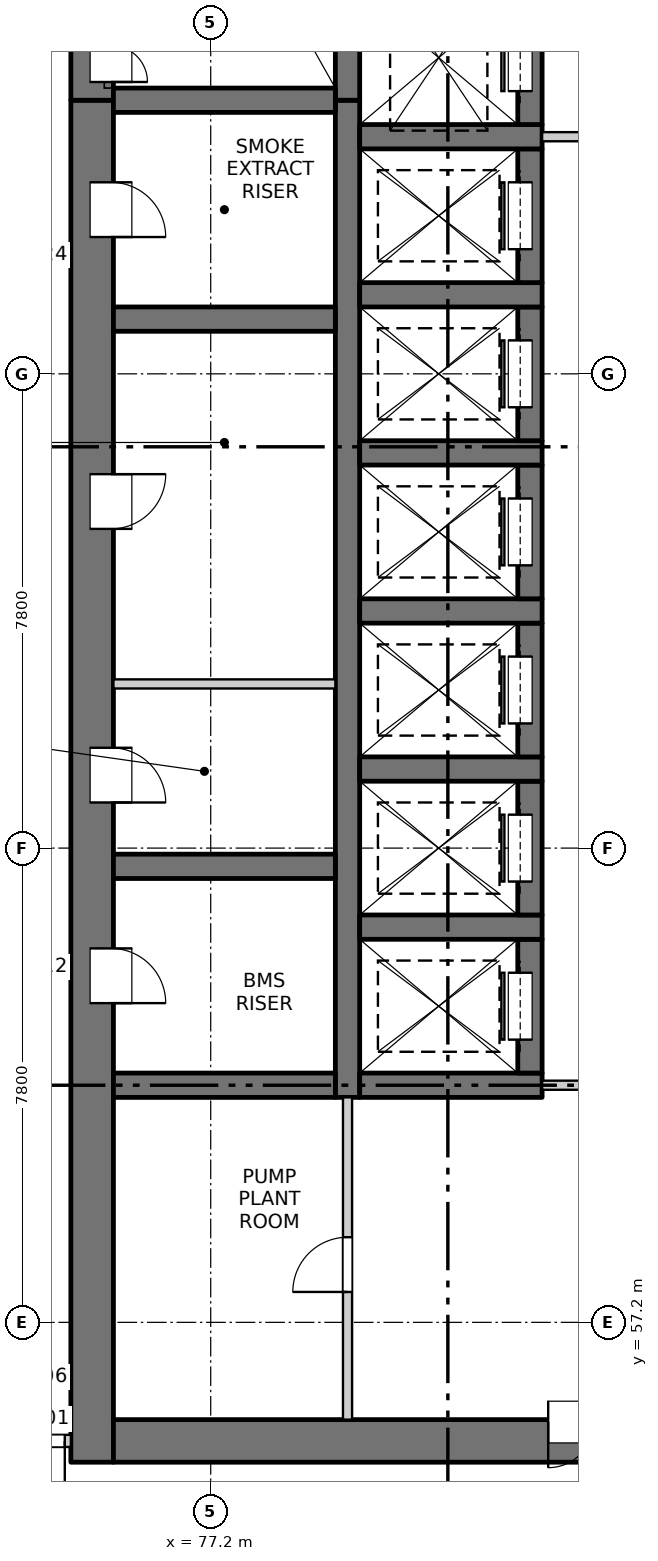
"""IFC4 building model, lengths in metres.
Left out: names, types, materials, properties, quantities, classifications, styles, units other than length and angle.
Written with IfcOpenShell. Run it as: python <this file> out.ifc"""

import sys

from ifc_helpers import new_model, si_unit, direction, frame, frame_2d, origin, place, context, subcontext, project, spatial, rectangle, extrude, element, fill, save


model = new_model("IFC4")
c1 = context("Model", 3, precision=1e-05, world=origin(), true_north=direction((0.0, 1.0)))
c2 = subcontext(c1, "Body", "Model", "MODEL_VIEW")
j1 = project(units=[si_unit("LENGTHUNIT", "METRE"), si_unit("PLANEANGLEUNIT", "RADIAN")], contexts=[c1])
p1 = place(None, origin())
s1 = spatial("IfcSite", under=j1, at=p1, CompositionType="ELEMENT")
p2 = place(p1, origin())
s2 = spatial("IfcBuilding", under=s1, at=p2, CompositionType="ELEMENT")
p3 = place(p2, frame((0.0, 0.0, 46.7)))
s3 = spatial("IfcBuildingStorey", under=s2, at=p3, CompositionType="ELEMENT", Elevation=46.7)
p4 = place(p3, frame((75.25, 54.9, -0.3), z_axis=(0.0, 0.0, 1.0), x_axis=(0.0, 1.0, 0.0)))
e1 = element("IfcWall", 1, at=p4, inside=s3, PredefinedType="SOLIDWALL", context=c2, shape_type="SweptSolid", body=[
    extrude(rectangle(XDim=22.4, YDim=0.7, at=frame_2d((11.2, 0.0))), origin(), (0.0, 0.0, 1.0), 4.5),
])
p5 = place(p4, frame((7.55, 0.0, 0.3)))
e2 = element("IfcOpeningElement", 2, at=p5, cuts=e1, PredefinedType="OPENING", context=c2, shape_type="SweptSolid", body=[
    extrude(rectangle(XDim=0.9, YDim=2.1, at=frame_2d((0.45, 1.05))), frame((0.0, 0.36, 0.0), z_axis=(0.0, -1.0, 0.0), x_axis=(1.0, 0.0, 0.0)), (0.0, 0.0, 1.0), 0.72),
])
p6 = place(p4, frame((10.85, 0.0, 0.3)))
e3 = element("IfcOpeningElement", 3, at=p6, cuts=e1, PredefinedType="OPENING", context=c2, shape_type="SweptSolid", body=[
    extrude(rectangle(XDim=0.9, YDim=2.1, at=frame_2d((0.45, 1.05))), frame((0.0, 0.36, 0.0), z_axis=(0.0, -1.0, 0.0), x_axis=(1.0, 0.0, 0.0)), (0.0, 0.0, 1.0), 0.72),
])
p7 = place(p4, frame((15.35, 0.0, 0.3)))
e4 = element("IfcOpeningElement", 4, at=p7, cuts=e1, PredefinedType="OPENING", context=c2, shape_type="SweptSolid", body=[
    extrude(rectangle(XDim=0.9, YDim=2.1, at=frame_2d((0.45, 1.05))), frame((0.0, 0.36, 0.0), z_axis=(0.0, -1.0, 0.0), x_axis=(1.0, 0.0, 0.0)), (0.0, 0.0, 1.0), 0.72),
])
p8 = place(p4, frame((20.15, 0.0, 0.3)))
e5 = element("IfcOpeningElement", 5, at=p8, cuts=e1, PredefinedType="OPENING", context=c2, shape_type="SweptSolid", body=[
    extrude(rectangle(XDim=0.9, YDim=2.1, at=frame_2d((0.45, 1.05))), frame((0.0, 0.36, 0.0), z_axis=(0.0, -1.0, 0.0), x_axis=(1.0, 0.0, 0.0)), (0.0, 0.0, 1.0), 0.72),
])
p9 = place(p3, frame((75.25, 77.3, -0.3), z_axis=(0.0, 0.0, 1.0), x_axis=(0.0, 1.0, 0.0)))
e6 = element("IfcWall", 6, at=p9, inside=s3, PredefinedType="SOLIDWALL", context=c2, shape_type="SweptSolid", body=[
    extrude(rectangle(XDim=7.55, YDim=0.7, at=frame_2d((3.775, 0.0))), origin(), (0.0, 0.0, 1.0), 4.5),
])
p10 = place(p9, frame((0.3, 0.0, 0.3)))
e7 = element("IfcOpeningElement", 7, at=p10, cuts=e6, PredefinedType="OPENING", context=c2, shape_type="SweptSolid", body=[
    extrude(rectangle(XDim=1.2, YDim=2.1, at=frame_2d((0.6, 1.05))), frame((0.0, 0.36, 0.0), z_axis=(0.0, -1.0, 0.0), x_axis=(1.0, 0.0, 0.0)), (0.0, 0.0, 1.0), 0.72),
])
p11 = place(p3, frame((75.6, 55.25, -0.3), z_axis=(0.0, 0.0, 1.0), x_axis=(1.0, 0.0, 0.0)))
e8 = element("IfcWall", 8, at=p11, inside=s3, PredefinedType="SOLIDWALL", context=c2, shape_type="SweptSolid", body=[
    extrude(rectangle(XDim=18.8, YDim=0.7, at=frame_2d((9.4, 0.0))), origin(), (0.0, 0.0, 1.0), 4.5),
])
p12 = place(p11, frame((7.15, 0.0, 0.3)))
e9 = element("IfcOpeningElement", 9, at=p12, cuts=e8, PredefinedType="OPENING", context=c2, shape_type="SweptSolid", body=[
    extrude(rectangle(XDim=1.5, YDim=2.1, at=frame_2d((0.75, 1.05))), frame((0.0, 0.36, 0.0), z_axis=(0.0, -1.0, 0.0), x_axis=(1.0, 0.0, 0.0)), (0.0, 0.0, 1.0), 0.72),
])
p13 = place(p3, frame((79.45, 60.9, -0.3), z_axis=(0.0, 0.0, 1.0), x_axis=(0.0, 1.0, 0.0)))
e10 = element("IfcWall", 10, at=p13, inside=s3, PredefinedType="SOLIDWALL", context=c2, shape_type="SweptSolid", body=[
    extrude(rectangle(XDim=16.4, YDim=0.4, at=frame_2d((8.2, 0.0))), origin(), (0.0, 0.0, 1.0), 4.5),
])
p14 = place(p3, frame((79.45, 77.3, -0.3), z_axis=(0.0, 0.0, 1.0), x_axis=(0.0, 1.0, 0.0)))
e11 = element("IfcWall", 11, at=p14, inside=s3, PredefinedType="SOLIDWALL", context=c2, shape_type="SweptSolid", body=[
    extrude(rectangle(XDim=6.85, YDim=0.4, at=frame_2d((3.425, 0.0))), origin(), (0.0, 0.0, 1.0), 4.5),
])
p15 = place(p3, frame((79.65, 61.1, -0.3), z_axis=(0.0, 0.0, 1.0), x_axis=(1.0, 0.0, 0.0)))
e12 = element("IfcWall", 12, at=p15, inside=s3, PredefinedType="SOLIDWALL", context=c2, shape_type="SweptSolid", body=[
    extrude(rectangle(XDim=3.0, YDim=0.4, at=frame_2d((1.5, 0.0))), origin(), (0.0, 0.0, 1.0), 4.5),
])
p16 = place(p3, frame((82.45, 61.3, -0.3), z_axis=(0.0, 0.0, 1.0), x_axis=(0.0, 1.0, 0.0)))
e13 = element("IfcWall", 13, at=p16, inside=s3, PredefinedType="SOLIDWALL", context=c2, shape_type="SweptSolid", body=[
    extrude(rectangle(XDim=2.2, YDim=0.4, at=frame_2d((1.1, 0.0))), origin(), (0.0, 0.0, 1.0), 4.5),
])
p17 = place(p16, frame((0.55, 0.0, 0.3)))
e14 = element("IfcOpeningElement", 14, at=p17, cuts=e13, PredefinedType="OPENING", context=c2, shape_type="SweptSolid", body=[
    extrude(rectangle(XDim=1.1, YDim=2.1, at=frame_2d((0.55, 1.05))), frame((0.0, 0.21, 0.0), z_axis=(0.0, -1.0, 0.0), x_axis=(1.0, 0.0, 0.0)), (0.0, 0.0, 1.0), 0.42),
])
p18 = place(p3, frame((79.65, 63.7, -0.3), z_axis=(0.0, 0.0, 1.0), x_axis=(1.0, 0.0, 0.0)))
e15 = element("IfcWall", 15, at=p18, inside=s3, PredefinedType="SOLIDWALL", context=c2, shape_type="SweptSolid", body=[
    extrude(rectangle(XDim=3.0, YDim=0.4, at=frame_2d((1.5, 0.0))), origin(), (0.0, 0.0, 1.0), 4.5),
])
p19 = place(p3, frame((82.45, 63.9, -0.3), z_axis=(0.0, 0.0, 1.0), x_axis=(0.0, 1.0, 0.0)))
e16 = element("IfcWall", 16, at=p19, inside=s3, PredefinedType="SOLIDWALL", context=c2, shape_type="SweptSolid", body=[
    extrude(rectangle(XDim=2.2, YDim=0.4, at=frame_2d((1.1, 0.0))), origin(), (0.0, 0.0, 1.0), 4.5),
])
p20 = place(p19, frame((0.55, 0.0, 0.3)))
e17 = element("IfcOpeningElement", 17, at=p20, cuts=e16, PredefinedType="OPENING", context=c2, shape_type="SweptSolid", body=[
    extrude(rectangle(XDim=1.1, YDim=2.1, at=frame_2d((0.55, 1.05))), frame((0.0, 0.21, 0.0), z_axis=(0.0, -1.0, 0.0), x_axis=(1.0, 0.0, 0.0)), (0.0, 0.0, 1.0), 0.42),
])
p21 = place(p3, frame((79.65, 66.3, -0.3), z_axis=(0.0, 0.0, 1.0), x_axis=(1.0, 0.0, 0.0)))
e18 = element("IfcWall", 18, at=p21, inside=s3, PredefinedType="SOLIDWALL", context=c2, shape_type="SweptSolid", body=[
    extrude(rectangle(XDim=3.0, YDim=0.4, at=frame_2d((1.5, 0.0))), origin(), (0.0, 0.0, 1.0), 4.5),
])
p22 = place(p3, frame((82.45, 66.5, -0.3), z_axis=(0.0, 0.0, 1.0), x_axis=(0.0, 1.0, 0.0)))
e19 = element("IfcWall", 19, at=p22, inside=s3, PredefinedType="SOLIDWALL", context=c2, shape_type="SweptSolid", body=[
    extrude(rectangle(XDim=2.2, YDim=0.4, at=frame_2d((1.1, 0.0))), origin(), (0.0, 0.0, 1.0), 4.5),
])
p23 = place(p22, frame((0.55, 0.0, 0.3)))
e20 = element("IfcOpeningElement", 20, at=p23, cuts=e19, PredefinedType="OPENING", context=c2, shape_type="SweptSolid", body=[
    extrude(rectangle(XDim=1.1, YDim=2.1, at=frame_2d((0.55, 1.05))), frame((0.0, 0.21, 0.0), z_axis=(0.0, -1.0, 0.0), x_axis=(1.0, 0.0, 0.0)), (0.0, 0.0, 1.0), 0.42),
])
p24 = place(p3, frame((79.65, 68.9, -0.3), z_axis=(0.0, 0.0, 1.0), x_axis=(1.0, 0.0, 0.0)))
e21 = element("IfcWall", 21, at=p24, inside=s3, PredefinedType="SOLIDWALL", context=c2, shape_type="SweptSolid", body=[
    extrude(rectangle(XDim=3.0, YDim=0.4, at=frame_2d((1.5, 0.0))), origin(), (0.0, 0.0, 1.0), 4.5),
])
p25 = place(p3, frame((82.45, 69.1, -0.3), z_axis=(0.0, 0.0, 1.0), x_axis=(0.0, 1.0, 0.0)))
e22 = element("IfcWall", 22, at=p25, inside=s3, PredefinedType="SOLIDWALL", context=c2, shape_type="SweptSolid", body=[
    extrude(rectangle(XDim=2.2, YDim=0.4, at=frame_2d((1.1, 0.0))), origin(), (0.0, 0.0, 1.0), 4.5),
])
p26 = place(p25, frame((0.55, 0.0, 0.3)))
e23 = element("IfcOpeningElement", 23, at=p26, cuts=e22, PredefinedType="OPENING", context=c2, shape_type="SweptSolid", body=[
    extrude(rectangle(XDim=1.1, YDim=2.1, at=frame_2d((0.55, 1.05))), frame((0.0, 0.21, 0.0), z_axis=(0.0, -1.0, 0.0), x_axis=(1.0, 0.0, 0.0)), (0.0, 0.0, 1.0), 0.42),
])
p27 = place(p3, frame((79.65, 71.5, -0.3), z_axis=(0.0, 0.0, 1.0), x_axis=(1.0, 0.0, 0.0)))
e24 = element("IfcWall", 24, at=p27, inside=s3, PredefinedType="SOLIDWALL", context=c2, shape_type="SweptSolid", body=[
    extrude(rectangle(XDim=3.0, YDim=0.4, at=frame_2d((1.5, 0.0))), origin(), (0.0, 0.0, 1.0), 4.5),
])
p28 = place(p3, frame((82.45, 71.7, -0.3), z_axis=(0.0, 0.0, 1.0), x_axis=(0.0, 1.0, 0.0)))
e25 = element("IfcWall", 25, at=p28, inside=s3, PredefinedType="SOLIDWALL", context=c2, shape_type="SweptSolid", body=[
    extrude(rectangle(XDim=2.2, YDim=0.4, at=frame_2d((1.1, 0.0))), origin(), (0.0, 0.0, 1.0), 4.5),
])
p29 = place(p28, frame((0.55, 0.0, 0.3)))
e26 = element("IfcOpeningElement", 26, at=p29, cuts=e25, PredefinedType="OPENING", context=c2, shape_type="SweptSolid", body=[
    extrude(rectangle(XDim=1.1, YDim=2.1, at=frame_2d((0.55, 1.05))), frame((0.0, 0.21, 0.0), z_axis=(0.0, -1.0, 0.0), x_axis=(1.0, 0.0, 0.0)), (0.0, 0.0, 1.0), 0.42),
])
p30 = place(p3, frame((79.65, 74.1, -0.3), z_axis=(0.0, 0.0, 1.0), x_axis=(1.0, 0.0, 0.0)))
e27 = element("IfcWall", 27, at=p30, inside=s3, PredefinedType="SOLIDWALL", context=c2, shape_type="SweptSolid", body=[
    extrude(rectangle(XDim=3.0, YDim=0.4, at=frame_2d((1.5, 0.0))), origin(), (0.0, 0.0, 1.0), 4.5),
])
p31 = place(p3, frame((82.45, 74.3, -0.3), z_axis=(0.0, 0.0, 1.0), x_axis=(0.0, 1.0, 0.0)))
e28 = element("IfcWall", 28, at=p31, inside=s3, PredefinedType="SOLIDWALL", context=c2, shape_type="SweptSolid", body=[
    extrude(rectangle(XDim=2.2, YDim=0.4, at=frame_2d((1.1, 0.0))), origin(), (0.0, 0.0, 1.0), 4.5),
])
p32 = place(p31, frame((0.55, 0.0, 0.3)))
e29 = element("IfcOpeningElement", 29, at=p32, cuts=e28, PredefinedType="OPENING", context=c2, shape_type="SweptSolid", body=[
    extrude(rectangle(XDim=1.1, YDim=2.1, at=frame_2d((0.55, 1.05))), frame((0.0, 0.21, 0.0), z_axis=(0.0, -1.0, 0.0), x_axis=(1.0, 0.0, 0.0)), (0.0, 0.0, 1.0), 0.42),
])
p33 = place(p3, frame((79.65, 76.7, -0.3), z_axis=(0.0, 0.0, 1.0), x_axis=(1.0, 0.0, 0.0)))
e30 = element("IfcWall", 30, at=p33, inside=s3, PredefinedType="SOLIDWALL", context=c2, shape_type="SweptSolid", body=[
    extrude(rectangle(XDim=3.0, YDim=0.4, at=frame_2d((1.5, 0.0))), origin(), (0.0, 0.0, 1.0), 4.5),
])
p34 = place(p3, frame((82.45, 76.9, -0.3), z_axis=(0.0, 0.0, 1.0), x_axis=(0.0, 1.0, 0.0)))
e31 = element("IfcWall", 31, at=p34, inside=s3, PredefinedType="SOLIDWALL", context=c2, shape_type="SweptSolid", body=[
    extrude(rectangle(XDim=2.2, YDim=0.4, at=frame_2d((1.1, 0.0))), origin(), (0.0, 0.0, 1.0), 4.5),
])
p35 = place(p34, frame((0.55, 0.0, 0.3)))
e32 = element("IfcOpeningElement", 32, at=p35, cuts=e31, PredefinedType="OPENING", context=c2, shape_type="SweptSolid", body=[
    extrude(rectangle(XDim=1.1, YDim=2.1, at=frame_2d((0.55, 1.05))), frame((0.0, 0.21, 0.0), z_axis=(0.0, -1.0, 0.0), x_axis=(1.0, 0.0, 0.0)), (0.0, 0.0, 1.0), 0.42),
])
for number, where, z_axis, x_axis in (
    (33, (75.6, 61.1, -0.3), (0.0, 0.0, 1.0), (1.0, 0.0, 0.0)),
    (34, (75.6, 64.7, -0.3), (0.0, 0.0, 1.0), (1.0, 0.0, 0.0)),
    (35, (75.6, 73.7, -0.3), (0.0, 0.0, 1.0), (1.0, 0.0, 0.0)),
    (36, (75.6, 77.3, -0.3), (0.0, 0.0, 1.0), (1.0, 0.0, 0.0)),
):
    element("IfcWall", number, at=place(p3, frame(where, z_axis=z_axis, x_axis=x_axis)), inside=s3, PredefinedType="SOLIDWALL", context=c2, shape_type="SweptSolid", body=[
        extrude(rectangle(XDim=3.65, YDim=0.4, at=frame_2d((1.825, 0.0))), origin(), (0.0, 0.0, 1.0), 4.5),
    ])
p36 = place(p3, frame((73.2, 55.25, 0.0), z_axis=(0.0, 0.0, 1.0), x_axis=(1.0, 0.0, 0.0)))
e37 = element("IfcWall", 37, at=p36, inside=s3, PredefinedType="PARTITIONING", context=c2, shape_type="SweptSolid", body=[
    extrude(rectangle(XDim=1.7, YDim=0.2, at=frame_2d((0.85, 0.0))), origin(), (0.0, 0.0, 1.0), 4.2),
])
p37 = place(p36, frame((0.1, 0.0, 0.0)))
e38 = element("IfcOpeningElement", 38, at=p37, cuts=e37, PredefinedType="OPENING", context=c2, shape_type="SweptSolid", body=[
    extrude(rectangle(XDim=1.5, YDim=2.1, at=frame_2d((0.75, 1.05))), frame((0.0, 0.11, 0.0), z_axis=(0.0, -1.0, 0.0), x_axis=(1.0, 0.0, 0.0)), (0.0, 0.0, 1.0), 0.22),
])
p38 = place(p3, frame((82.65, 61.1, 0.0), z_axis=(0.0, 0.0, 1.0), x_axis=(1.0, 0.0, 0.0)))
e39 = element("IfcWall", 39, at=p38, inside=s3, PredefinedType="PARTITIONING", context=c2, shape_type="SweptSolid", body=[
    extrude(rectangle(XDim=4.7, YDim=0.15, at=frame_2d((2.35, 0.0))), origin(), (0.0, 0.0, 1.0), 4.2),
])
p39 = place(p38, frame((1.45, 0.0, 0.0)))
e40 = element("IfcOpeningElement", 40, at=p39, cuts=e39, PredefinedType="OPENING", context=c2, shape_type="SweptSolid", body=[
    extrude(rectangle(XDim=1.8, YDim=2.1, at=frame_2d((0.9, 1.05))), frame((0.0, 0.085, 0.0), z_axis=(0.0, -1.0, 0.0), x_axis=(1.0, 0.0, 0.0)), (0.0, 0.0, 1.0), 0.17),
])
p40 = place(p3, frame((75.6, 67.7, 0.0), z_axis=(0.0, 0.0, 1.0), x_axis=(1.0, 0.0, 0.0)))
e41 = element("IfcWall", 41, at=p40, inside=s3, PredefinedType="PARTITIONING", context=c2, shape_type="SweptSolid", body=[
    extrude(rectangle(XDim=3.65, YDim=0.15, at=frame_2d((1.825, 0.0))), origin(), (0.0, 0.0, 1.0), 4.2),
])
p41 = place(p3, frame((82.65, 76.7, 0.0), z_axis=(0.0, 0.0, 1.0), x_axis=(1.0, 0.0, 0.0)))
e42 = element("IfcWall", 42, at=p41, inside=s3, PredefinedType="PARTITIONING", context=c2, shape_type="SweptSolid", body=[
    extrude(rectangle(XDim=4.7, YDim=0.15, at=frame_2d((2.35, 0.0))), origin(), (0.0, 0.0, 1.0), 4.2),
])
p42 = place(p41, frame((1.45, 0.0, 0.0)))
e43 = element("IfcOpeningElement", 43, at=p42, cuts=e42, PredefinedType="OPENING", context=c2, shape_type="SweptSolid", body=[
    extrude(rectangle(XDim=1.8, YDim=2.1, at=frame_2d((0.9, 1.05))), frame((0.0, 0.085, 0.0), z_axis=(0.0, -1.0, 0.0), x_axis=(1.0, 0.0, 0.0)), (0.0, 0.0, 1.0), 0.17),
])
p43 = place(p3, frame((79.45, 55.6, 0.0), z_axis=(0.0, 0.0, 1.0), x_axis=(0.0, 1.0, 0.0)))
e44 = element("IfcWall", 44, at=p43, inside=s3, PredefinedType="PARTITIONING", context=c2, shape_type="SweptSolid", body=[
    extrude(rectangle(XDim=5.3, YDim=0.15, at=frame_2d((2.65, 0.0))), origin(), (0.0, 0.0, 1.0), 4.2),
])
p44 = place(p43, frame((2.1, 0.0, 0.0)))
e45 = element("IfcOpeningElement", 45, at=p44, cuts=e44, PredefinedType="OPENING", context=c2, shape_type="SweptSolid", body=[
    extrude(rectangle(XDim=0.9, YDim=2.1, at=frame_2d((0.45, 1.05))), frame((0.0, 0.085, 0.0), z_axis=(0.0, -1.0, 0.0), x_axis=(1.0, 0.0, 0.0)), (0.0, 0.0, 1.0), 0.17),
])
p45 = place(p37, origin())
e46 = element("IfcDoor", 46, at=p45, inside=s3, OperationType="DOUBLE_DOOR_SINGLE_SWING", PredefinedType="DOOR", context=c2, shape_type="SweptSolid", body=[
    extrude(rectangle(XDim=1.5, YDim=2.1, at=frame_2d((0.75, 1.05))), frame((0.0, 0.025, 0.0), z_axis=(0.0, -1.0, 0.0), x_axis=(1.0, 0.0, 0.0)), (0.0, 0.0, 1.0), 0.05),
])
fill(e38, e46)
p46 = place(p12, origin())
e47 = element("IfcDoor", 47, at=p46, inside=s3, OperationType="DOUBLE_DOOR_SINGLE_SWING", PredefinedType="DOOR", context=c2, shape_type="SweptSolid", body=[
    extrude(rectangle(XDim=1.5, YDim=2.1, at=frame_2d((0.75, 1.05))), frame((0.0, 0.335, 0.0), z_axis=(0.0, -1.0, 0.0), x_axis=(1.0, 0.0, 0.0)), (0.0, 0.0, 1.0), 0.05),
])
fill(e9, e47)
p47 = place(p44, origin())
e48 = element("IfcDoor", 48, at=p47, inside=s3, OperationType="SINGLE_SWING_LEFT", PredefinedType="DOOR", context=c2, shape_type="SweptSolid", body=[
    extrude(rectangle(XDim=0.9, YDim=2.1, at=frame_2d((0.45, 1.05))), frame((0.0, 0.025, 0.0), z_axis=(0.0, -1.0, 0.0), x_axis=(1.0, 0.0, 0.0)), (0.0, 0.0, 1.0), 0.05),
])
fill(e45, e48)
p48 = place(p17, origin())
e49 = element("IfcDoor", 49, at=p48, inside=s3, OperationType="SLIDING_TO_RIGHT", PredefinedType="DOOR", context=c2, shape_type="SweptSolid", body=[
    extrude(rectangle(XDim=1.1, YDim=2.1, at=frame_2d((0.55, 1.05))), frame((0.0, 0.185, 0.0), z_axis=(0.0, -1.0, 0.0), x_axis=(1.0, 0.0, 0.0)), (0.0, 0.0, 1.0), 0.05),
])
fill(e14, e49)
p49 = place(p5, origin())
e50 = element("IfcDoor", 50, at=p49, inside=s3, OperationType="SINGLE_SWING_RIGHT", PredefinedType="DOOR", context=c2, shape_type="SweptSolid", body=[
    extrude(rectangle(XDim=0.9, YDim=2.1, at=frame_2d((0.45, 1.05))), frame((0.0, -0.285, 0.0), z_axis=(0.0, -1.0, 0.0), x_axis=(1.0, 0.0, 0.0)), (0.0, 0.0, 1.0), 0.05),
])
fill(e2, e50)
p50 = place(p20, origin())
e51 = element("IfcDoor", 51, at=p50, inside=s3, OperationType="SLIDING_TO_RIGHT", PredefinedType="DOOR", context=c2, shape_type="SweptSolid", body=[
    extrude(rectangle(XDim=1.1, YDim=2.1, at=frame_2d((0.55, 1.05))), frame((0.0, 0.185, 0.0), z_axis=(0.0, -1.0, 0.0), x_axis=(1.0, 0.0, 0.0)), (0.0, 0.0, 1.0), 0.05),
])
fill(e17, e51)
p51 = place(p6, origin())
e52 = element("IfcDoor", 52, at=p51, inside=s3, OperationType="SINGLE_SWING_RIGHT", PredefinedType="DOOR", context=c2, shape_type="SweptSolid", body=[
    extrude(rectangle(XDim=0.9, YDim=2.1, at=frame_2d((0.45, 1.05))), frame((0.0, -0.285, 0.0), z_axis=(0.0, -1.0, 0.0), x_axis=(1.0, 0.0, 0.0)), (0.0, 0.0, 1.0), 0.05),
])
fill(e3, e52)
p52 = place(p23, origin())
e53 = element("IfcDoor", 53, at=p52, inside=s3, OperationType="SLIDING_TO_RIGHT", PredefinedType="DOOR", context=c2, shape_type="SweptSolid", body=[
    extrude(rectangle(XDim=1.1, YDim=2.1, at=frame_2d((0.55, 1.05))), frame((0.0, 0.185, 0.0), z_axis=(0.0, -1.0, 0.0), x_axis=(1.0, 0.0, 0.0)), (0.0, 0.0, 1.0), 0.05),
])
fill(e20, e53)
p53 = place(p26, origin())
e54 = element("IfcDoor", 54, at=p53, inside=s3, OperationType="SLIDING_TO_LEFT", PredefinedType="DOOR", context=c2, shape_type="SweptSolid", body=[
    extrude(rectangle(XDim=1.1, YDim=2.1, at=frame_2d((0.55, 1.05))), frame((0.0, 0.185, 0.0), z_axis=(0.0, -1.0, 0.0), x_axis=(1.0, 0.0, 0.0)), (0.0, 0.0, 1.0), 0.05),
])
fill(e23, e54)
p54 = place(p7, origin())
e55 = element("IfcDoor", 55, at=p54, inside=s3, OperationType="SINGLE_SWING_LEFT", PredefinedType="DOOR", context=c2, shape_type="SweptSolid", body=[
    extrude(rectangle(XDim=0.9, YDim=2.1, at=frame_2d((0.45, 1.05))), frame((0.0, -0.285, 0.0), z_axis=(0.0, -1.0, 0.0), x_axis=(1.0, 0.0, 0.0)), (0.0, 0.0, 1.0), 0.05),
])
fill(e4, e55)
p55 = place(p29, origin())
e56 = element("IfcDoor", 56, at=p55, inside=s3, OperationType="SLIDING_TO_LEFT", PredefinedType="DOOR", context=c2, shape_type="SweptSolid", body=[
    extrude(rectangle(XDim=1.1, YDim=2.1, at=frame_2d((0.55, 1.05))), frame((0.0, 0.185, 0.0), z_axis=(0.0, -1.0, 0.0), x_axis=(1.0, 0.0, 0.0)), (0.0, 0.0, 1.0), 0.05),
])
fill(e26, e56)
p56 = place(p32, origin())
e57 = element("IfcDoor", 57, at=p56, inside=s3, OperationType="SLIDING_TO_LEFT", PredefinedType="DOOR", context=c2, shape_type="SweptSolid", body=[
    extrude(rectangle(XDim=1.1, YDim=2.1, at=frame_2d((0.55, 1.05))), frame((0.0, 0.185, 0.0), z_axis=(0.0, -1.0, 0.0), x_axis=(1.0, 0.0, 0.0)), (0.0, 0.0, 1.0), 0.05),
])
fill(e29, e57)
p57 = place(p8, origin())
e58 = element("IfcDoor", 58, at=p57, inside=s3, OperationType="SINGLE_SWING_RIGHT", PredefinedType="DOOR", context=c2, shape_type="SweptSolid", body=[
    extrude(rectangle(XDim=0.9, YDim=2.1, at=frame_2d((0.45, 1.05))), frame((0.0, -0.285, 0.0), z_axis=(0.0, -1.0, 0.0), x_axis=(1.0, 0.0, 0.0)), (0.0, 0.0, 1.0), 0.05),
])
fill(e5, e58)
p58 = place(p35, origin())
e59 = element("IfcDoor", 59, at=p58, inside=s3, OperationType="SLIDING_TO_LEFT", PredefinedType="DOOR", context=c2, shape_type="SweptSolid", body=[
    extrude(rectangle(XDim=1.1, YDim=2.1, at=frame_2d((0.55, 1.05))), frame((0.0, 0.185, 0.0), z_axis=(0.0, -1.0, 0.0), x_axis=(1.0, 0.0, 0.0)), (0.0, 0.0, 1.0), 0.05),
])
fill(e32, e59)
p59 = place(p10, origin())
e60 = element("IfcDoor", 60, at=p59, inside=s3, OperationType="DOUBLE_DOOR_SINGLE_SWING", PredefinedType="DOOR", context=c2, shape_type="SweptSolid", body=[
    extrude(rectangle(XDim=1.2, YDim=2.1, at=frame_2d((0.6, 1.05))), frame((0.0, -0.285, 0.0), z_axis=(0.0, -1.0, 0.0), x_axis=(1.0, 0.0, 0.0)), (0.0, 0.0, 1.0), 0.05),
])
fill(e7, e60)
save(model, sys.argv[1])
